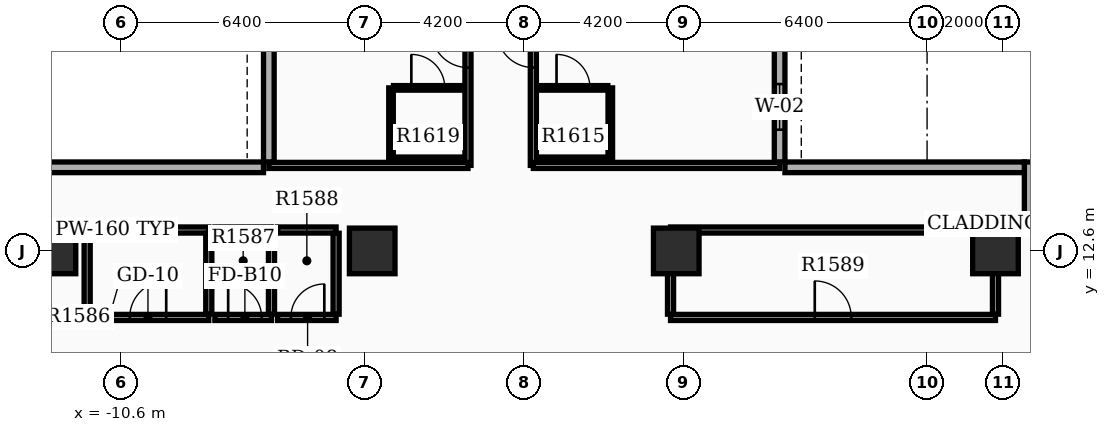
"""IFC4 building model, lengths in metres.
Left out: names, types, materials, properties, quantities, classifications, styles, units other than length and angle.
Written with IfcOpenShell. Run it as: python <this file> out.ifc"""

import sys

from ifc_helpers import new_model, si_unit, direction, frame, frame_2d, origin, origin_2d, place, context, subcontext, project, spatial, rectangle, extrude, element, fill, save


model = new_model("IFC4")
c1 = context("Model", 3, precision=1e-05, world=origin(), true_north=direction((0.0, 1.0)))
c2 = subcontext(c1, "Body", "Model", "MODEL_VIEW")
j1 = project(units=[si_unit("LENGTHUNIT", "METRE"), si_unit("PLANEANGLEUNIT", "RADIAN")], contexts=[c1])
p1 = place(None, origin())
s1 = spatial("IfcSite", under=j1, at=p1, CompositionType="ELEMENT")
p2 = place(p1, origin())
s2 = spatial("IfcBuilding", under=s1, at=p2, CompositionType="ELEMENT")
p3 = place(p2, frame((0.0, 0.0, 104.7)))
s3 = spatial("IfcBuildingStorey", under=s2, at=p3, CompositionType="ELEMENT", Elevation=104.7)
for number, where, z_axis, x_axis in (
    (1, (12.4, 12.6, 0.0), (0.0, 0.0, 1.0), (1.0, 0.0, 0.0)),
    (2, (-12.4, 12.6, 0.0), (0.0, 0.0, 1.0), (1.0, 0.0, 0.0)),
    (3, (4.0, 12.6, 0.0), (0.0, 0.0, 1.0), (1.0, 0.0, 0.0)),
    (4, (-4.0, 12.6, 0.0), (0.0, 0.0, 1.0), (1.0, 0.0, 0.0)),
):
    element("IfcColumn", number, at=place(p3, frame(where, z_axis=z_axis, x_axis=x_axis)), inside=s3, PredefinedType="COLUMN", context=c2, shape_type="SweptSolid", body=[
        extrude(rectangle(XDim=1.2, YDim=1.2, at=origin_2d()), origin(), (0.0, 0.0, 1.0), 3.9),
    ])
p4 = place(p3, frame((6.72, 14.94, 0.0), z_axis=(0.0, 0.0, 1.0), x_axis=(0.0, 1.0, 0.0)))
e5 = element("IfcWall", 5, at=p4, inside=s3, PredefinedType="STANDARD", context=c2, shape_type="SweptSolid", body=[
    extrude(rectangle(XDim=20.1, YDim=0.28, at=frame_2d((10.05, 0.0))), origin(), (0.0, 0.0, 1.0), 2.97),
])
p5 = place(p4, frame((0.85, 0.0, 0.8)))
e6 = element("IfcOpeningElement", 6, at=p5, cuts=e5, PredefinedType="OPENING", context=c2, shape_type="SweptSolid", body=[
    extrude(rectangle(XDim=1.2, YDim=1.6, at=frame_2d((0.6, 0.8))), frame((0.0, 0.15, 0.0), z_axis=(0.0, -1.0, 0.0), x_axis=(1.0, 0.0, 0.0)), (0.0, 0.0, 1.0), 0.3),
])
p6 = place(p4, frame((4.05, 0.0, 0.8)))
e7 = element("IfcOpeningElement", 7, at=p6, cuts=e5, PredefinedType="OPENING", context=c2, shape_type="SweptSolid", body=[
    extrude(rectangle(XDim=1.2, YDim=1.6, at=frame_2d((0.6, 0.8))), frame((0.0, 0.15, 0.0), z_axis=(0.0, -1.0, 0.0), x_axis=(1.0, 0.0, 0.0)), (0.0, 0.0, 1.0), 0.3),
])
p7 = place(p4, frame((7.25, 0.0, 0.8)))
e8 = element("IfcOpeningElement", 8, at=p7, cuts=e5, PredefinedType="OPENING", context=c2, shape_type="SweptSolid", body=[
    extrude(rectangle(XDim=1.2, YDim=1.6, at=frame_2d((0.6, 0.8))), frame((0.0, 0.15, 0.0), z_axis=(0.0, -1.0, 0.0), x_axis=(1.0, 0.0, 0.0)), (0.0, 0.0, 1.0), 0.3),
])
p8 = place(p4, frame((10.45, 0.0, 0.8)))
e9 = element("IfcOpeningElement", 9, at=p8, cuts=e5, PredefinedType="OPENING", context=c2, shape_type="SweptSolid", body=[
    extrude(rectangle(XDim=1.2, YDim=1.6, at=frame_2d((0.6, 0.8))), frame((0.0, 0.15, 0.0), z_axis=(0.0, -1.0, 0.0), x_axis=(1.0, 0.0, 0.0)), (0.0, 0.0, 1.0), 0.3),
])
p9 = place(p3, frame((-6.72, 35.04, 0.0), z_axis=(0.0, 0.0, 1.0), x_axis=(0.0, -1.0, 0.0)))
e10 = element("IfcWall", 10, at=p9, inside=s3, PredefinedType="STANDARD", context=c2, shape_type="SweptSolid", body=[
    extrude(rectangle(XDim=20.1, YDim=0.28, at=frame_2d((10.05, 0.0))), origin(), (0.0, 0.0, 1.0), 2.97),
])
p10 = place(p9, frame((0.85, 0.0, 0.8)))
e11 = element("IfcOpeningElement", 11, at=p10, cuts=e10, PredefinedType="OPENING", context=c2, shape_type="SweptSolid", body=[
    extrude(rectangle(XDim=1.2, YDim=1.6, at=frame_2d((0.6, 0.8))), frame((0.0, 0.15, 0.0), z_axis=(0.0, -1.0, 0.0), x_axis=(1.0, 0.0, 0.0)), (0.0, 0.0, 1.0), 0.3),
])
p11 = place(p9, frame((4.05, 0.0, 0.8)))
e12 = element("IfcOpeningElement", 12, at=p11, cuts=e10, PredefinedType="OPENING", context=c2, shape_type="SweptSolid", body=[
    extrude(rectangle(XDim=1.2, YDim=1.6, at=frame_2d((0.6, 0.8))), frame((0.0, 0.15, 0.0), z_axis=(0.0, -1.0, 0.0), x_axis=(1.0, 0.0, 0.0)), (0.0, 0.0, 1.0), 0.3),
])
p12 = place(p9, frame((7.25, 0.0, 0.8)))
e13 = element("IfcOpeningElement", 13, at=p12, cuts=e10, PredefinedType="OPENING", context=c2, shape_type="SweptSolid", body=[
    extrude(rectangle(XDim=1.2, YDim=1.6, at=frame_2d((0.6, 0.8))), frame((0.0, 0.15, 0.0), z_axis=(0.0, -1.0, 0.0), x_axis=(1.0, 0.0, 0.0)), (0.0, 0.0, 1.0), 0.3),
])
p13 = place(p9, frame((10.95, 0.0, 0.8)))
e14 = element("IfcOpeningElement", 14, at=p13, cuts=e10, PredefinedType="OPENING", context=c2, shape_type="SweptSolid", body=[
    extrude(rectangle(XDim=1.2, YDim=1.6, at=frame_2d((0.6, 0.8))), frame((0.0, 0.15, 0.0), z_axis=(0.0, -1.0, 0.0), x_axis=(1.0, 0.0, 0.0)), (0.0, 0.0, 1.0), 0.3),
])
p14 = place(p9, frame((14.799, 0.0, 0.85)))
e15 = element("IfcOpeningElement", 15, at=p14, cuts=e10, PredefinedType="OPENING", context=c2, shape_type="SweptSolid", body=[
    extrude(rectangle(XDim=1.2, YDim=1.6, at=frame_2d((0.6, 0.8))), frame((0.0, 0.15, 0.0), z_axis=(0.0, -1.0, 0.0), x_axis=(1.0, 0.0, 0.0)), (0.0, 0.0, 1.0), 0.3),
])
p15 = place(p3, frame((13.3, 13.44, 0.0), z_axis=(0.0, 0.0, 1.0), x_axis=(0.0, 1.0, 0.0)))
e16 = element("IfcWall", 16, at=p15, inside=s3, PredefinedType="STANDARD", context=c2, shape_type="SweptSolid", body=[
    extrude(rectangle(XDim=1.5, YDim=0.28, at=frame_2d((0.75, 0.0))), origin(), (0.0, 0.0, 1.0), 2.97),
])
for number, where, z_axis, x_axis in (
    (17, (13.16, 14.8, 0.0), (0.0, 0.0, 1.0), (-1.0, 0.0, 0.0)),
    (18, (-13.16, 14.8, 0.0), (0.0, 0.0, 1.0), (1.0, 0.0, 0.0)),
):
    element("IfcWall", number, at=place(p3, frame(where, z_axis=z_axis, x_axis=x_axis)), inside=s3, PredefinedType="STANDARD", context=c2, shape_type="SweptSolid", body=[
        extrude(rectangle(XDim=6.3, YDim=0.28, at=frame_2d((3.15, 0.0))), origin(), (0.0, 0.0, 1.0), 2.97),
    ])
p16 = place(p3, frame((-11.5, 10.85, 0.0), z_axis=(0.0, 0.0, 1.0), x_axis=(1.0, 0.0, 0.0)))
e19 = element("IfcWall", 19, at=p16, inside=s3, PredefinedType="PARTITIONING", context=c2, shape_type="SweptSolid", body=[
    extrude(rectangle(XDim=3.2, YDim=0.16, at=frame_2d((1.6, 0.0))), origin(), (0.0, 0.0, 1.0), 2.96),
])
p17 = place(p16, frame((1.12, 0.0, 0.0)))
e20 = element("IfcOpeningElement", 20, at=p17, cuts=e19, PredefinedType="OPENING", context=c2, shape_type="SweptSolid", body=[
    extrude(rectangle(XDim=0.96, YDim=2.15, at=frame_2d((0.48, 1.075))), frame((0.0, 0.09, 0.0), z_axis=(0.0, -1.0, 0.0), x_axis=(1.0, 0.0, 0.0)), (0.0, 0.0, 1.0), 0.18),
])
p18 = place(p3, frame((-11.5, 13.15, 0.0), z_axis=(0.0, 0.0, 1.0), x_axis=(1.0, 0.0, 0.0)))
e21 = element("IfcWall", 21, at=p18, inside=s3, PredefinedType="PARTITIONING", context=c2, shape_type="SweptSolid", body=[
    extrude(rectangle(XDim=3.2, YDim=0.16, at=frame_2d((1.6, 0.0))), origin(), (0.0, 0.0, 1.0), 2.96),
])
for number, where, z_axis, x_axis in (
    (22, (-11.5, 10.935, 0.0), (0.0, 0.0, 1.0), (0.0, 1.0, 0.0)),
    (23, (-8.3, 10.935, 0.0), (0.0, 0.0, 1.0), (0.0, 1.0, 0.0)),
):
    element("IfcWall", number, at=place(p3, frame(where, z_axis=z_axis, x_axis=x_axis)), inside=s3, PredefinedType="PARTITIONING", context=c2, shape_type="SweptSolid", body=[
        extrude(rectangle(XDim=2.13, YDim=0.16, at=frame_2d((1.065, 0.0))), origin(), (0.0, 0.0, 1.0), 2.96),
    ])
p19 = place(p3, frame((-8.14, 10.85, 0.0), z_axis=(0.0, 0.0, 1.0), x_axis=(1.0, 0.0, 0.0)))
e24 = element("IfcWall", 24, at=p19, inside=s3, PredefinedType="PARTITIONING", context=c2, shape_type="SweptSolid", body=[
    extrude(rectangle(XDim=1.49, YDim=0.16, at=frame_2d((0.745, 0.0))), origin(), (0.0, 0.0, 1.0), 2.96),
])
p20 = place(p19, frame((0.35, 0.0, 0.0)))
e25 = element("IfcOpeningElement", 25, at=p20, cuts=e24, PredefinedType="OPENING", context=c2, shape_type="SweptSolid", body=[
    extrude(rectangle(XDim=0.88, YDim=2.1, at=frame_2d((0.44, 1.05))), frame((0.0, 0.09, 0.0), z_axis=(0.0, -1.0, 0.0), x_axis=(1.0, 0.0, 0.0)), (0.0, 0.0, 1.0), 0.18),
])
p21 = place(p3, frame((-8.14, 13.15, 0.0), z_axis=(0.0, 0.0, 1.0), x_axis=(1.0, 0.0, 0.0)))
e26 = element("IfcWall", 26, at=p21, inside=s3, PredefinedType="PARTITIONING", context=c2, shape_type="SweptSolid", body=[
    extrude(rectangle(XDim=1.49, YDim=0.16, at=frame_2d((0.745, 0.0))), origin(), (0.0, 0.0, 1.0), 2.96),
])
p22 = place(p3, frame((-6.65, 10.935, 0.0), z_axis=(0.0, 0.0, 1.0), x_axis=(0.0, 1.0, 0.0)))
e27 = element("IfcWall", 27, at=p22, inside=s3, PredefinedType="PARTITIONING", context=c2, shape_type="SweptSolid", body=[
    extrude(rectangle(XDim=2.13, YDim=0.16, at=frame_2d((1.065, 0.0))), origin(), (0.0, 0.0, 1.0), 2.96),
])
p23 = place(p3, frame((-6.49, 10.85, 0.0), z_axis=(0.0, 0.0, 1.0), x_axis=(1.0, 0.0, 0.0)))
e28 = element("IfcWall", 28, at=p23, inside=s3, PredefinedType="PARTITIONING", context=c2, shape_type="SweptSolid", body=[
    extrude(rectangle(XDim=1.54, YDim=0.16, at=frame_2d((0.77, 0.0))), origin(), (0.0, 0.0, 1.0), 2.96),
])
p24 = place(p23, frame((0.35, 0.0, 0.0)))
e29 = element("IfcOpeningElement", 29, at=p24, cuts=e28, PredefinedType="OPENING", context=c2, shape_type="SweptSolid", body=[
    extrude(rectangle(XDim=0.88, YDim=2.15, at=frame_2d((0.44, 1.075))), frame((0.0, 0.09, 0.0), z_axis=(0.0, -1.0, 0.0), x_axis=(1.0, 0.0, 0.0)), (0.0, 0.0, 1.0), 0.18),
])
p25 = place(p3, frame((-6.49, 13.15, 0.0), z_axis=(0.0, 0.0, 1.0), x_axis=(1.0, 0.0, 0.0)))
e30 = element("IfcWall", 30, at=p25, inside=s3, PredefinedType="PARTITIONING", context=c2, shape_type="SweptSolid", body=[
    extrude(rectangle(XDim=1.54, YDim=0.16, at=frame_2d((0.77, 0.0))), origin(), (0.0, 0.0, 1.0), 2.96),
])
p26 = place(p3, frame((-4.95, 10.935, 0.0), z_axis=(0.0, 0.0, 1.0), x_axis=(0.0, 1.0, 0.0)))
e31 = element("IfcWall", 31, at=p26, inside=s3, PredefinedType="PARTITIONING", context=c2, shape_type="SweptSolid", body=[
    extrude(rectangle(XDim=2.13, YDim=0.16, at=frame_2d((1.065, 0.0))), origin(), (0.0, 0.0, 1.0), 2.96),
])
p27 = place(p3, frame((3.85, 10.85, 0.0), z_axis=(0.0, 0.0, 1.0), x_axis=(1.0, 0.0, 0.0)))
e32 = element("IfcWall", 32, at=p27, inside=s3, PredefinedType="PARTITIONING", context=c2, shape_type="SweptSolid", body=[
    extrude(rectangle(XDim=8.55, YDim=0.16, at=frame_2d((4.275, 0.0))), origin(), (0.0, 0.0, 1.0), 2.96),
])
p28 = place(p27, frame((3.795, 0.0, 0.0)))
e33 = element("IfcOpeningElement", 33, at=p28, cuts=e32, PredefinedType="OPENING", context=c2, shape_type="SweptSolid", body=[
    extrude(rectangle(XDim=0.96, YDim=2.15, at=frame_2d((0.48, 1.075))), frame((0.0, 0.09, 0.0), z_axis=(0.0, -1.0, 0.0), x_axis=(1.0, 0.0, 0.0)), (0.0, 0.0, 1.0), 0.18),
])
p29 = place(p3, frame((3.85, 13.15, 0.0), z_axis=(0.0, 0.0, 1.0), x_axis=(1.0, 0.0, 0.0)))
e34 = element("IfcWall", 34, at=p29, inside=s3, PredefinedType="PARTITIONING", context=c2, shape_type="SweptSolid", body=[
    extrude(rectangle(XDim=8.55, YDim=0.16, at=frame_2d((4.275, 0.0))), origin(), (0.0, 0.0, 1.0), 2.96),
])
for number, where, z_axis, x_axis in (
    (35, (3.85, 10.935, 0.0), (0.0, 0.0, 1.0), (0.0, 1.0, 0.0)),
    (36, (12.4, 10.935, 0.0), (0.0, 0.0, 1.0), (0.0, 1.0, 0.0)),
):
    element("IfcWall", number, at=place(p3, frame(where, z_axis=z_axis, x_axis=x_axis)), inside=s3, PredefinedType="PARTITIONING", context=c2, shape_type="SweptSolid", body=[
        extrude(rectangle(XDim=2.13, YDim=0.16, at=frame_2d((1.065, 0.0))), origin(), (0.0, 0.0, 1.0), 2.96),
    ])
p30 = place(p3, frame((0.24, 14.85, 0.0), z_axis=(0.0, 0.0, 1.0), x_axis=(0.0, 1.0, 0.0)))
e37 = element("IfcWall", 37, at=p30, inside=s3, PredefinedType="PARTITIONING", context=c2, shape_type="SweptSolid", body=[
    extrude(rectangle(XDim=9.7, YDim=0.16, at=frame_2d((4.85, 0.0))), origin(), (0.0, 0.0, 1.0), 2.96),
])
p31 = place(p30, frame((2.575, 0.0, 0.0)))
e38 = element("IfcOpeningElement", 38, at=p31, cuts=e37, PredefinedType="OPENING", context=c2, shape_type="SweptSolid", body=[
    extrude(rectangle(XDim=0.96, YDim=2.15, at=frame_2d((0.48, 1.075))), frame((0.0, 0.09, 0.0), z_axis=(0.0, -1.0, 0.0), x_axis=(1.0, 0.0, 0.0)), (0.0, 0.0, 1.0), 0.18),
])
p32 = place(p30, frame((8.097, 0.0, 0.0)))
e39 = element("IfcOpeningElement", 39, at=p32, cuts=e37, PredefinedType="OPENING", context=c2, shape_type="SweptSolid", body=[
    extrude(rectangle(XDim=0.96, YDim=2.15, at=frame_2d((0.48, 1.075))), frame((0.0, 0.09, 0.0), z_axis=(0.0, -1.0, 0.0), x_axis=(1.0, 0.0, 0.0)), (0.0, 0.0, 1.0), 0.18),
])
p33 = place(p3, frame((0.24, 14.85, 0.0), z_axis=(0.0, 0.0, 1.0), x_axis=(1.0, 0.0, 0.0)))
e40 = element("IfcWall", 40, at=p33, inside=s3, PredefinedType="PARTITIONING", context=c2, shape_type="SweptSolid", body=[
    extrude(rectangle(XDim=6.48, YDim=0.16, at=frame_2d((3.24, 0.0))), origin(), (0.0, 0.0, 1.0), 2.96),
])
p34 = place(p3, frame((0.38, 16.89, 0.0), z_axis=(0.0, 0.0, 1.0), x_axis=(1.0, 0.0, 0.0)))
e41 = element("IfcWall", 41, at=p34, inside=s3, PredefinedType="PARTITIONING", context=c2, shape_type="SweptSolid", body=[
    extrude(rectangle(XDim=1.82, YDim=0.12, at=frame_2d((0.91, 0.0))), origin(), (0.0, 0.0, 1.0), 2.96),
])
p35 = place(p34, frame((0.47, 0.0, 0.0)))
e42 = element("IfcOpeningElement", 42, at=p35, cuts=e41, PredefinedType="OPENING", context=c2, shape_type="SweptSolid", body=[
    extrude(rectangle(XDim=0.88, YDim=2.1, at=frame_2d((0.44, 1.05))), frame((0.0, 0.07, 0.0), z_axis=(0.0, -1.0, 0.0), x_axis=(1.0, 0.0, 0.0)), (0.0, 0.0, 1.0), 0.14),
])
p36 = place(p3, frame((0.38, 15.01, 0.0), z_axis=(0.0, 0.0, 1.0), x_axis=(1.0, 0.0, 0.0)))
e43 = element("IfcWall", 43, at=p36, inside=s3, PredefinedType="PARTITIONING", context=c2, shape_type="SweptSolid", body=[
    extrude(rectangle(XDim=1.82, YDim=0.12, at=frame_2d((0.91, 0.0))), origin(), (0.0, 0.0, 1.0), 2.96),
])
p37 = place(p3, frame((2.265, 15.01, 0.0), z_axis=(0.0, 0.0, 1.0), x_axis=(0.0, 1.0, 0.0)))
e44 = element("IfcWall", 44, at=p37, inside=s3, PredefinedType="PARTITIONING", context=c2, shape_type="SweptSolid", body=[
    extrude(rectangle(XDim=1.88, YDim=0.12, at=frame_2d((0.94, 0.0))), origin(), (0.0, 0.0, 1.0), 2.96),
])
p38 = place(p3, frame((-1.48, 14.85, 0.0), z_axis=(0.0, 0.0, 1.0), x_axis=(0.0, 1.0, 0.0)))
e45 = element("IfcWall", 45, at=p38, inside=s3, PredefinedType="PARTITIONING", context=c2, shape_type="SweptSolid", body=[
    extrude(rectangle(XDim=9.7, YDim=0.16, at=frame_2d((4.85, 0.0))), origin(), (0.0, 0.0, 1.0), 2.96),
])
p39 = place(p38, frame((2.575, 0.0, 0.0)))
e46 = element("IfcOpeningElement", 46, at=p39, cuts=e45, PredefinedType="OPENING", context=c2, shape_type="SweptSolid", body=[
    extrude(rectangle(XDim=0.96, YDim=2.15, at=frame_2d((0.48, 1.075))), frame((0.0, 0.09, 0.0), z_axis=(0.0, -1.0, 0.0), x_axis=(1.0, 0.0, 0.0)), (0.0, 0.0, 1.0), 0.18),
])
p40 = place(p38, frame((8.097, 0.0, 0.0)))
e47 = element("IfcOpeningElement", 47, at=p40, cuts=e45, PredefinedType="OPENING", context=c2, shape_type="SweptSolid", body=[
    extrude(rectangle(XDim=0.96, YDim=2.15, at=frame_2d((0.48, 1.075))), frame((0.0, 0.09, 0.0), z_axis=(0.0, -1.0, 0.0), x_axis=(1.0, 0.0, 0.0)), (0.0, 0.0, 1.0), 0.18),
])
p41 = place(p3, frame((-1.48, 14.85, 0.0), z_axis=(0.0, 0.0, 1.0), x_axis=(-1.0, 0.0, 0.0)))
e48 = element("IfcWall", 48, at=p41, inside=s3, PredefinedType="PARTITIONING", context=c2, shape_type="SweptSolid", body=[
    extrude(rectangle(XDim=5.24, YDim=0.16, at=frame_2d((2.62, 0.0))), origin(), (0.0, 0.0, 1.0), 2.96),
])
p42 = place(p3, frame((-3.44, 16.89, 0.0), z_axis=(0.0, 0.0, 1.0), x_axis=(1.0, 0.0, 0.0)))
e49 = element("IfcWall", 49, at=p42, inside=s3, PredefinedType="PARTITIONING", context=c2, shape_type="SweptSolid", body=[
    extrude(rectangle(XDim=1.82, YDim=0.12, at=frame_2d((0.91, 0.0))), origin(), (0.0, 0.0, 1.0), 2.96),
])
p43 = place(p42, frame((0.47, 0.0, 0.0)))
e50 = element("IfcOpeningElement", 50, at=p43, cuts=e49, PredefinedType="OPENING", context=c2, shape_type="SweptSolid", body=[
    extrude(rectangle(XDim=0.88, YDim=2.1, at=frame_2d((0.44, 1.05))), frame((0.0, 0.07, 0.0), z_axis=(0.0, -1.0, 0.0), x_axis=(1.0, 0.0, 0.0)), (0.0, 0.0, 1.0), 0.14),
])
p44 = place(p3, frame((-3.44, 15.01, 0.0), z_axis=(0.0, 0.0, 1.0), x_axis=(1.0, 0.0, 0.0)))
e51 = element("IfcWall", 51, at=p44, inside=s3, PredefinedType="PARTITIONING", context=c2, shape_type="SweptSolid", body=[
    extrude(rectangle(XDim=1.82, YDim=0.12, at=frame_2d((0.91, 0.0))), origin(), (0.0, 0.0, 1.0), 2.96),
])
p45 = place(p3, frame((-3.505, 15.01, 0.0), z_axis=(0.0, 0.0, 1.0), x_axis=(0.0, 1.0, 0.0)))
e52 = element("IfcWall", 52, at=p45, inside=s3, PredefinedType="PARTITIONING", context=c2, shape_type="SweptSolid", body=[
    extrude(rectangle(XDim=1.88, YDim=0.12, at=frame_2d((0.94, 0.0))), origin(), (0.0, 0.0, 1.0), 2.96),
])
p46 = place(p5, origin())
e53 = element("IfcWindow", 53, at=p46, inside=s3, PartitioningType="SINGLE_PANEL", PredefinedType="WINDOW", context=c2, shape_type="SweptSolid", body=[
    extrude(rectangle(XDim=1.2, YDim=1.6, at=frame_2d((0.6, 0.8))), frame((0.0, 0.03, 0.0), z_axis=(0.0, -1.0, 0.0), x_axis=(1.0, 0.0, 0.0)), (0.0, 0.0, 1.0), 0.06),
])
fill(e6, e53)
p47 = place(p17, origin())
e54 = element("IfcDoor", 54, at=p47, inside=s3, OperationType="SINGLE_SWING_RIGHT", PredefinedType="DOOR", context=c2, shape_type="SweptSolid", body=[
    extrude(rectangle(XDim=0.96, YDim=2.15, at=frame_2d((0.48, 1.075))), frame((0.0, 0.025, 0.0), z_axis=(0.0, -1.0, 0.0), x_axis=(1.0, 0.0, 0.0)), (0.0, 0.0, 1.0), 0.05),
])
fill(e20, e54)
p48 = place(p20, origin())
e55 = element("IfcDoor", 55, at=p48, inside=s3, OperationType="SINGLE_SWING_LEFT", PredefinedType="DOOR", context=c2, shape_type="SweptSolid", body=[
    extrude(rectangle(XDim=0.88, YDim=2.1, at=frame_2d((0.44, 1.05))), frame((0.0, 0.025, 0.0), z_axis=(0.0, -1.0, 0.0), x_axis=(1.0, 0.0, 0.0)), (0.0, 0.0, 1.0), 0.05),
])
fill(e25, e55)
p49 = place(p24, origin())
e56 = element("IfcDoor", 56, at=p49, inside=s3, OperationType="SINGLE_SWING_RIGHT", PredefinedType="DOOR", context=c2, shape_type="SweptSolid", body=[
    extrude(rectangle(XDim=0.88, YDim=2.15, at=frame_2d((0.44, 1.075))), frame((0.0, 0.025, 0.0), z_axis=(0.0, -1.0, 0.0), x_axis=(1.0, 0.0, 0.0)), (0.0, 0.0, 1.0), 0.05),
])
fill(e29, e56)
p50 = place(p28, origin())
e57 = element("IfcDoor", 57, at=p50, inside=s3, OperationType="SINGLE_SWING_LEFT", PredefinedType="DOOR", context=c2, shape_type="SweptSolid", body=[
    extrude(rectangle(XDim=0.96, YDim=2.15, at=frame_2d((0.48, 1.075))), frame((0.0, 0.025, 0.0), z_axis=(0.0, -1.0, 0.0), x_axis=(1.0, 0.0, 0.0)), (0.0, 0.0, 1.0), 0.05),
])
fill(e33, e57)
p51 = place(p31, origin())
e58 = element("IfcDoor", 58, at=p51, inside=s3, OperationType="SINGLE_SWING_RIGHT", PredefinedType="DOOR", context=c2, shape_type="SweptSolid", body=[
    extrude(rectangle(XDim=0.96, YDim=2.15, at=frame_2d((0.48, 1.075))), frame((0.0, 0.025, 0.0), z_axis=(0.0, -1.0, 0.0), x_axis=(1.0, 0.0, 0.0)), (0.0, 0.0, 1.0), 0.05),
])
fill(e38, e58)
p52 = place(p35, origin())
e59 = element("IfcDoor", 59, at=p52, inside=s3, OperationType="SINGLE_SWING_LEFT", PredefinedType="DOOR", context=c2, shape_type="SweptSolid", body=[
    extrude(rectangle(XDim=0.88, YDim=2.1, at=frame_2d((0.44, 1.05))), frame((0.0, 0.025, 0.0), z_axis=(0.0, -1.0, 0.0), x_axis=(1.0, 0.0, 0.0)), (0.0, 0.0, 1.0), 0.05),
])
fill(e42, e59)
p53 = place(p39, origin())
e60 = element("IfcDoor", 60, at=p53, inside=s3, OperationType="SINGLE_SWING_RIGHT", PredefinedType="DOOR", context=c2, shape_type="SweptSolid", body=[
    extrude(rectangle(XDim=0.96, YDim=2.15, at=frame_2d((0.48, 1.075))), frame((0.0, 0.025, 0.0), z_axis=(0.0, -1.0, 0.0), x_axis=(1.0, 0.0, 0.0)), (0.0, 0.0, 1.0), 0.05),
])
fill(e46, e60)
p54 = place(p43, origin())
e61 = element("IfcDoor", 61, at=p54, inside=s3, OperationType="SINGLE_SWING_LEFT", PredefinedType="DOOR", context=c2, shape_type="SweptSolid", body=[
    extrude(rectangle(XDim=0.88, YDim=2.1, at=frame_2d((0.44, 1.05))), frame((0.0, 0.025, 0.0), z_axis=(0.0, -1.0, 0.0), x_axis=(1.0, 0.0, 0.0)), (0.0, 0.0, 1.0), 0.05),
])
fill(e50, e61)
save(model, sys.argv[1])
